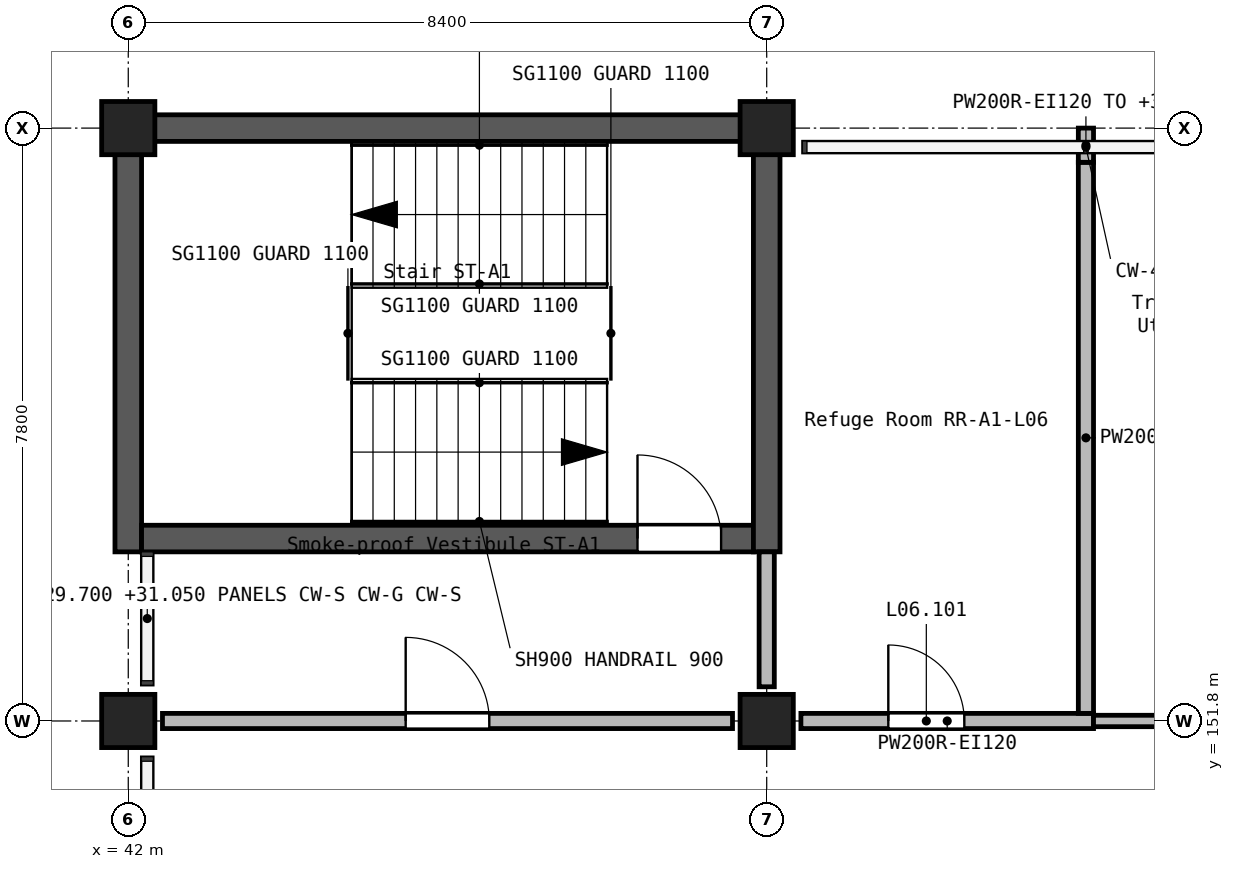
"""IFC4 building model, lengths in metres.
Left out: names, types, materials, properties, quantities, classifications, styles, units other than length and angle.
Written with IfcOpenShell. Run it as: python <this file> out.ifc"""

import sys

from ifc_helpers import new_model, si_unit, direction, frame, frame_2d, origin, origin_2d, place, context, subcontext, project, spatial, rectangle, extrude, element, fill, save


model = new_model("IFC4")
c1 = context("Model", 3, precision=1e-05, world=origin(), true_north=direction((0.0, 1.0)))
c2 = subcontext(c1, "Body", "Model", "MODEL_VIEW")
j1 = project(units=[si_unit("LENGTHUNIT", "METRE"), si_unit("PLANEANGLEUNIT", "RADIAN")], contexts=[c1])
p1 = place(None, origin())
s1 = spatial("IfcSite", under=j1, at=p1, CompositionType="ELEMENT")
p2 = place(p1, origin())
s2 = spatial("IfcBuilding", under=s1, at=p2, CompositionType="ELEMENT")
p3 = place(p2, frame((0.0, 0.0, 28.8)))
s3 = spatial("IfcBuildingStorey", under=s2, at=p3, CompositionType="ELEMENT", Elevation=28.8)
for number, where, z_axis, x_axis in (
    (1, (42.0, 151.8, 0.0), (0.0, 0.0, 1.0), (1.0, 0.0, 0.0)),
    (2, (42.0, 159.6, 0.0), (0.0, 0.0, 1.0), (1.0, 0.0, 0.0)),
    (3, (50.4, 151.8, 0.0), (0.0, 0.0, 1.0), (1.0, 0.0, 0.0)),
    (4, (50.4, 159.6, 0.0), (0.0, 0.0, 1.0), (1.0, 0.0, 0.0)),
):
    element("IfcColumn", number, at=place(p3, frame(where, z_axis=z_axis, x_axis=x_axis)), inside=s3, PredefinedType="COLUMN", context=c2, shape_type="SweptSolid", body=[
        extrude(rectangle(XDim=0.7, YDim=0.7, at=origin_2d()), origin(), (0.0, 0.0, 1.0), 3.9),
    ])
p4 = place(p3, frame((41.825, 159.6, 0.0), z_axis=(0.0, 0.0, 1.0), x_axis=(1.0, 0.0, 0.0)))
e5 = element("IfcWall", 5, at=p4, inside=s3, PredefinedType="SHEAR", context=c2, shape_type="SweptSolid", body=[
    extrude(rectangle(XDim=8.4, YDim=0.35, at=frame_2d((4.2, 0.0))), origin(), (0.0, 0.0, 1.0), 3.9),
])
p5 = place(p3, frame((42.0, 154.025, 0.0), z_axis=(0.0, 0.0, 1.0), x_axis=(0.0, 1.0, 0.0)))
e6 = element("IfcWall", 6, at=p5, inside=s3, PredefinedType="SHEAR", context=c2, shape_type="SweptSolid", body=[
    extrude(rectangle(XDim=5.4, YDim=0.35, at=frame_2d((2.7, 0.0))), origin(), (0.0, 0.0, 1.0), 3.9),
])
p6 = place(p3, frame((42.175, 154.2, 0.0), z_axis=(0.0, 0.0, 1.0), x_axis=(1.0, 0.0, 0.0)))
e7 = element("IfcWall", 7, at=p6, inside=s3, PredefinedType="SHEAR", context=c2, shape_type="SweptSolid", body=[
    extrude(rectangle(XDim=8.05, YDim=0.35, at=frame_2d((4.025, 0.0))), origin(), (0.0, 0.0, 1.0), 3.9),
])
p7 = place(p6, frame((6.525, 0.0, 0.0)))
e8 = element("IfcOpeningElement", 8, at=p7, cuts=e7, PredefinedType="OPENING", context=c2, shape_type="SweptSolid", body=[
    extrude(rectangle(XDim=1.1, YDim=2.1, at=frame_2d((0.55, 1.05))), frame((0.0, 0.185, 0.0), z_axis=(0.0, -1.0, 0.0), x_axis=(1.0, 0.0, 0.0)), (0.0, 0.0, 1.0), 0.37),
])
p8 = place(p3, frame((50.4, 154.025, 0.0), z_axis=(0.0, 0.0, 1.0), x_axis=(0.0, 1.0, 0.0)))
e9 = element("IfcWall", 9, at=p8, inside=s3, PredefinedType="SHEAR", context=c2, shape_type="SweptSolid", body=[
    extrude(rectangle(XDim=5.75, YDim=0.35, at=frame_2d((2.875, 0.0))), origin(), (0.0, 0.0, 1.0), 3.9),
])
p9 = place(p3, frame((42.45, 151.8, 0.0), z_axis=(0.0, 0.0, 1.0), x_axis=(1.0, 0.0, 0.0)))
e10 = element("IfcWall", 10, at=p9, inside=s3, PredefinedType="SOLIDWALL", context=c2, shape_type="SweptSolid", body=[
    extrude(rectangle(XDim=7.5, YDim=0.2, at=frame_2d((3.75, 0.0))), origin(), (0.0, 0.0, 1.0), 3.6),
])
p10 = place(p9, frame((3.2, 0.0, 0.0)))
e11 = element("IfcOpeningElement", 11, at=p10, cuts=e10, PredefinedType="OPENING", context=c2, shape_type="SweptSolid", body=[
    extrude(rectangle(XDim=1.1, YDim=2.1, at=frame_2d((0.55, 1.05))), frame((0.0, 0.11, 0.0), z_axis=(0.0, -1.0, 0.0), x_axis=(1.0, 0.0, 0.0)), (0.0, 0.0, 1.0), 0.22),
])
p11 = place(p3, frame((50.85, 151.8, 0.0), z_axis=(0.0, 0.0, 1.0), x_axis=(1.0, 0.0, 0.0)))
e12 = element("IfcWall", 12, at=p11, inside=s3, PredefinedType="SOLIDWALL", context=c2, shape_type="SweptSolid", body=[
    extrude(rectangle(XDim=3.85, YDim=0.2, at=frame_2d((1.925, 0.0))), origin(), (0.0, 0.0, 1.0), 3.6),
])
p12 = place(p11, frame((1.15, 0.0, 0.0)))
e13 = element("IfcOpeningElement", 13, at=p12, cuts=e12, PredefinedType="OPENING", context=c2, shape_type="SweptSolid", body=[
    extrude(rectangle(XDim=1.0, YDim=2.1, at=frame_2d((0.5, 1.05))), frame((0.0, 0.11, 0.0), z_axis=(0.0, -1.0, 0.0), x_axis=(1.0, 0.0, 0.0)), (0.0, 0.0, 1.0), 0.22),
])
p13 = place(p3, frame((50.4, 152.25, 0.0), z_axis=(0.0, 0.0, 1.0), x_axis=(0.0, 1.0, 0.0)))
e14 = element("IfcWall", 14, at=p13, inside=s3, PredefinedType="SOLIDWALL", context=c2, shape_type="SweptSolid", body=[
    extrude(rectangle(XDim=1.775, YDim=0.2, at=frame_2d((0.887, 0.0))), origin(), (0.0, 0.0, 1.0), 3.6),
])
p14 = place(p3, frame((54.6, 151.9, 0.0), z_axis=(0.0, 0.0, 1.0), x_axis=(0.0, 1.0, 0.0)))
e15 = element("IfcWall", 15, at=p14, inside=s3, PredefinedType="SOLIDWALL", context=c2, shape_type="SweptSolid", body=[
    extrude(rectangle(XDim=7.25, YDim=0.2, at=frame_2d((3.625, 0.0))), origin(), (0.0, 0.0, 1.0), 3.6),
])
p15 = place(p3, frame((54.6, 159.15, 0.0), z_axis=(0.0, 0.0, 1.0), x_axis=(0.0, 1.0, 0.0)))
e16 = element("IfcWall", 16, at=p15, inside=s3, PredefinedType="SOLIDWALL", context=c2, shape_type="SweptSolid", body=[
    extrude(rectangle(XDim=0.45, YDim=0.2, at=frame_2d((0.225, 0.0))), origin(), (0.0, 0.0, 1.0), 2.78),
])
p16 = place(p3, frame((54.7, 151.8, 0.0), z_axis=(0.0, 0.0, 1.0), x_axis=(1.0, 0.0, 0.0)))
e17 = element("IfcWall", 17, at=p16, inside=s3, PredefinedType="PARTITIONING", context=c2, shape_type="SweptSolid", body=[
    extrude(rectangle(XDim=3.65, YDim=0.15, at=frame_2d((1.825, 0.0))), origin(), (0.0, 0.0, 1.0), 3.6),
])
p17 = place(p16, frame((1.5, 0.0, 0.0)))
e18 = element("IfcOpeningElement", 18, at=p17, cuts=e17, PredefinedType="OPENING", context=c2, shape_type="SweptSolid", body=[
    extrude(rectangle(XDim=1.0, YDim=2.1, at=frame_2d((0.5, 1.05))), frame((0.0, 0.085, 0.0), z_axis=(0.0, -1.0, 0.0), x_axis=(1.0, 0.0, 0.0)), (0.0, 0.0, 1.0), 0.17),
])
p18 = place(p12, origin())
e19 = element("IfcDoor", 19, at=p18, inside=s3, OperationType="SINGLE_SWING_LEFT", PredefinedType="DOOR", context=c2, shape_type="SweptSolid", body=[
    extrude(rectangle(XDim=1.0, YDim=2.1, at=frame_2d((0.5, 1.05))), frame((0.0, 0.025, 0.0), z_axis=(0.0, -1.0, 0.0), x_axis=(1.0, 0.0, 0.0)), (0.0, 0.0, 1.0), 0.05),
])
fill(e13, e19)
p19 = place(p7, origin())
e20 = element("IfcDoor", 20, at=p19, inside=s3, OperationType="SINGLE_SWING_RIGHT", PredefinedType="DOOR", context=c2, shape_type="SweptSolid", body=[
    extrude(rectangle(XDim=1.1, YDim=2.1, at=frame_2d((0.55, 1.05))), frame((0.0, 0.025, 0.0), z_axis=(0.0, -1.0, 0.0), x_axis=(1.0, 0.0, 0.0)), (0.0, 0.0, 1.0), 0.05),
])
fill(e8, e20)
p20 = place(p10, origin())
e21 = element("IfcDoor", 21, at=p20, inside=s3, OperationType="SINGLE_SWING_RIGHT", PredefinedType="DOOR", context=c2, shape_type="SweptSolid", body=[
    extrude(rectangle(XDim=1.1, YDim=2.1, at=frame_2d((0.55, 1.05))), frame((0.0, 0.025, 0.0), z_axis=(0.0, -1.0, 0.0), x_axis=(1.0, 0.0, 0.0)), (0.0, 0.0, 1.0), 0.05),
])
fill(e11, e21)
save(model, sys.argv[1])
